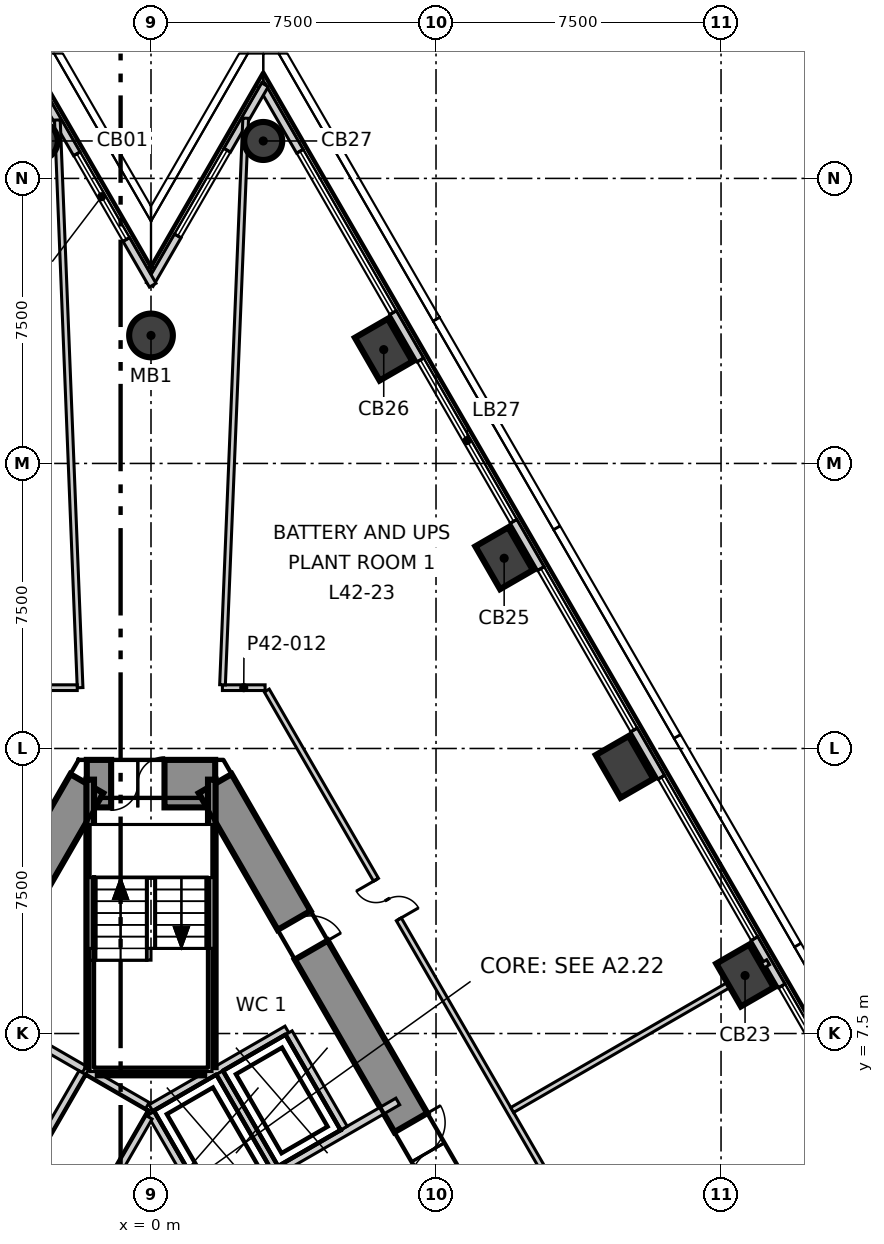
"""IFC4 building model, lengths in metres.
Left out: names, types, materials, properties, quantities, classifications, styles, units other than length and angle.
Written with IfcOpenShell. Run it as: python <this file> out.ifc"""

import sys

from ifc_helpers import new_model, si_unit, direction, frame, frame_2d, origin, origin_2d, place, context, subcontext, project, spatial, polyline, rectangle, circle, outline, extrude, element, fill, save


model = new_model("IFC4")
c1 = context("Model", 3, precision=1e-05, world=origin(), true_north=direction((0.0, 1.0)))
c2 = subcontext(c1, "Body", "Model", "MODEL_VIEW")
j1 = project(units=[si_unit("LENGTHUNIT", "METRE"), si_unit("PLANEANGLEUNIT", "RADIAN")], contexts=[c1])
p1 = place(None, origin())
s1 = spatial("IfcSite", under=j1, at=p1, CompositionType="ELEMENT")
p2 = place(p1, origin())
s2 = spatial("IfcBuilding", under=s1, at=p2, CompositionType="ELEMENT")
p3 = place(p2, frame((0.0, 0.0, 180.8)))
s3 = spatial("IfcBuildingStorey", under=s2, at=p3, CompositionType="ELEMENT", Elevation=180.8)
p4 = place(p3, frame((1.689, 14.075, -0.6), z_axis=(0.0, 0.0, 1.0), x_axis=(-1.0, 0.0, 0.0)))
e1 = element("IfcWall", 1, at=p4, inside=s3, PredefinedType="SHEAR", context=c2, shape_type="SweptSolid", body=[
    extrude(outline(polyline([(-0.216, -0.625), (1.689, -0.625), (3.594, -0.625), (3.161, 0.625), (1.689, 0.625), (0.217, 0.625), (-0.216, -0.625)])), origin(), (0.0, 0.0, 1.0), 4.5),
])
p5 = place(p4, frame((1.336, 0.0, 0.6)))
e2 = element("IfcOpeningElement", 2, at=p5, cuts=e1, PredefinedType="OPENING", context=c2, shape_type="SweptSolid", body=[
    extrude(rectangle(XDim=1.4, YDim=2.1, at=frame_2d((0.7, 1.05))), frame((0.0, 0.635, 0.0), z_axis=(0.0, -1.0, 0.0), x_axis=(1.0, 0.0, 0.0)), (0.0, 0.0, 1.0), 1.27),
])
p6 = place(p3, frame((-1.689, 14.075, -0.6), z_axis=(0.0, 0.0, 1.0), x_axis=(-0.500003116884, -0.866023604243, 0.0)))
e3 = element("IfcWall", 3, at=p6, inside=s3, PredefinedType="SHEAR", context=c2, shape_type="SweptSolid", body=[
    extrude(outline(polyline([(-0.433, -0.5), (1.53, -0.5), (3.493, -0.5), (5.456, -0.5), (7.419, -0.5), (9.382, -0.5), (11.345, -0.5), (13.308, -0.5), (15.271, -0.5), (17.234, -0.5), (19.197, -0.5), (21.16, -0.5), (23.123, -0.5), (22.257, 0.5), (20.273, 0.5), (18.289, 0.5), (16.305, 0.5), (14.321, 0.5), (12.337, 0.5), (10.353, 0.5), (8.369, 0.5), (6.385, 0.5), (4.401, 0.5), (2.417, 0.5), (0.433, 0.5), (-0.433, -0.5)])), origin(), (0.0, 0.0, 1.0), 4.5),
])
p7 = place(p6, frame((10.939, 0.0, 0.6)))
e4 = element("IfcOpeningElement", 4, at=p7, cuts=e3, PredefinedType="OPENING", context=c2, shape_type="SweptSolid", body=[
    extrude(rectangle(XDim=1.1, YDim=2.1, at=frame_2d((0.55, 1.05))), frame((0.0, 0.51, 0.0), z_axis=(0.0, -1.0, 0.0), x_axis=(1.0, 0.0, 0.0)), (0.0, 0.0, 1.0), 1.02),
])
p8 = place(p3, frame((13.034, -5.575, -0.6), z_axis=(0.0, 0.0, 1.0), x_axis=(-0.500003116884, 0.866023604243, 0.0)))
e5 = element("IfcWall", 5, at=p8, inside=s3, PredefinedType="SHEAR", context=c2, shape_type="SweptSolid", body=[
    extrude(outline(polyline([(-0.433, -0.5), (1.53, -0.5), (3.493, -0.5), (5.456, -0.5), (7.419, -0.5), (9.382, -0.5), (11.345, -0.5), (13.308, -0.5), (15.271, -0.5), (17.234, -0.5), (19.197, -0.5), (21.16, -0.5), (23.123, -0.5), (22.257, 0.5), (20.273, 0.5), (18.289, 0.5), (16.305, 0.5), (14.321, 0.5), (12.337, 0.5), (10.353, 0.5), (8.369, 0.5), (6.385, 0.5), (4.401, 0.5), (2.417, 0.5), (0.433, 0.5), (-0.433, -0.5)])), origin(), (0.0, 0.0, 1.0), 4.5),
])
p9 = place(p8, frame((10.589, 0.0, 0.6)))
e6 = element("IfcOpeningElement", 6, at=p9, cuts=e5, PredefinedType="OPENING", context=c2, shape_type="SweptSolid", body=[
    extrude(rectangle(XDim=1.8, YDim=2.1, at=frame_2d((0.9, 1.05))), frame((0.0, 0.51, 0.0), z_axis=(0.0, -1.0, 0.0), x_axis=(1.0, 0.0, 0.0)), (0.0, 0.0, 1.0), 1.02),
])
p10 = place(p8, frame((17.634, 0.0, 0.6)))
e7 = element("IfcOpeningElement", 7, at=p10, cuts=e5, PredefinedType="OPENING", context=c2, shape_type="SweptSolid", body=[
    extrude(rectangle(XDim=0.9, YDim=2.1, at=frame_2d((0.45, 1.05))), frame((0.0, 0.51, 0.0), z_axis=(0.0, -1.0, 0.0), x_axis=(1.0, 0.0, 0.0)), (0.0, 0.0, 1.0), 1.02),
])
p11 = place(p8, frame((4.445, 0.0, 0.6)))
e8 = element("IfcOpeningElement", 8, at=p11, cuts=e5, PredefinedType="OPENING", context=c2, shape_type="SweptSolid", body=[
    extrude(rectangle(XDim=0.9, YDim=2.1, at=frame_2d((0.45, 1.05))), frame((0.0, 0.51, 0.0), z_axis=(0.0, -1.0, 0.0), x_axis=(1.0, 0.0, 0.0)), (0.0, 0.0, 1.0), 1.02),
])
p12 = place(p3, frame((-2.954, 30.985, -0.6), z_axis=(0.0, 0.0, 1.0), x_axis=(0.5, 0.866025403784, 0.0)))
e9 = element("IfcColumn", 9, at=p12, inside=s3, PredefinedType="COLUMN", context=c2, shape_type="SweptSolid", body=[
    extrude(circle(Radius=0.5, at=origin_2d()), origin(), (0.0, 0.0, 1.0), 4.5),
])
for number, where, z_axis, x_axis in (
    (10, (15.632, 9.026, -0.6), (0.0, 0.0, 1.0), (-0.5, 0.866, 0.0)),
    (11, (12.463, 14.515, -0.6), (0.0, 0.0, 1.0), (-0.5, 0.866, 0.0)),
    (12, (9.293, 20.005, -0.6), (0.0, 0.0, 1.0), (-0.5, 0.866, 0.0)),
    (13, (6.124, 25.495, -0.6), (0.0, 0.0, 1.0), (-0.5, 0.866, 0.0)),
):
    element("IfcColumn", number, at=place(p3, frame(where, z_axis=z_axis, x_axis=x_axis)), inside=s3, PredefinedType="COLUMN", context=c2, shape_type="SweptSolid", body=[
        extrude(rectangle(XDim=1.3, YDim=1.0, at=origin_2d()), origin(), (0.0, 0.0, 1.0), 4.5),
    ])
p13 = place(p3, frame((2.954, 30.985, -0.6), z_axis=(0.0, 0.0, 1.0), x_axis=(-0.5, 0.866025403784, 0.0)))
e14 = element("IfcColumn", 14, at=p13, inside=s3, PredefinedType="COLUMN", context=c2, shape_type="SweptSolid", body=[
    extrude(circle(Radius=0.5, at=origin_2d()), origin(), (0.0, 0.0, 1.0), 4.5),
])
p14 = place(p3, frame((0.0, 25.868, -0.6), z_axis=(0.0, 0.0, 1.0), x_axis=(1.0, 0.0, 0.0)))
e15 = element("IfcColumn", 15, at=p14, inside=s3, PredefinedType="COLUMN", context=c2, shape_type="SweptSolid", body=[
    extrude(circle(Radius=0.575, at=origin_2d()), origin(), (0.0, 0.0, 1.0), 4.5),
])
p15 = place(p3, frame((29.569, -13.712, 0.0), z_axis=(0.0, 0.0, 1.0), x_axis=(-0.500011769953, 0.866018608292, 0.0)))
e16 = element("IfcWall", 16, at=p15, inside=s3, PredefinedType="ELEMENTEDWALL", context=c2, shape_type="SweptSolid", body=[
    extrude(rectangle(XDim=53.299, YDim=0.2, at=frame_2d((26.649, 0.0))), origin(), (0.0, 0.0, 1.0), 3.9),
])
p16 = place(p15, frame((2.022, 0.0, 0.6)))
e17 = element("IfcOpeningElement", 17, at=p16, cuts=e16, PredefinedType="OPENING", context=c2, shape_type="SweptSolid", body=[
    extrude(rectangle(XDim=4.9, YDim=3.0, at=frame_2d((2.45, 1.5))), frame((0.0, 0.11, 0.0), z_axis=(0.0, -1.0, 0.0), x_axis=(1.0, 0.0, 0.0)), (0.0, 0.0, 1.0), 0.22),
])
p17 = place(p15, frame((8.361, 0.0, 0.6)))
e18 = element("IfcOpeningElement", 18, at=p17, cuts=e16, PredefinedType="OPENING", context=c2, shape_type="SweptSolid", body=[
    extrude(rectangle(XDim=4.9, YDim=3.0, at=frame_2d((2.45, 1.5))), frame((0.0, 0.11, 0.0), z_axis=(0.0, -1.0, 0.0), x_axis=(1.0, 0.0, 0.0)), (0.0, 0.0, 1.0), 0.22),
])
p18 = place(p15, frame((14.701, 0.0, 0.6)))
e19 = element("IfcOpeningElement", 19, at=p18, cuts=e16, PredefinedType="OPENING", context=c2, shape_type="SweptSolid", body=[
    extrude(rectangle(XDim=4.9, YDim=3.0, at=frame_2d((2.45, 1.5))), frame((0.0, 0.11, 0.0), z_axis=(0.0, -1.0, 0.0), x_axis=(1.0, 0.0, 0.0)), (0.0, 0.0, 1.0), 0.22),
])
p19 = place(p15, frame((21.04, 0.0, 0.6)))
e20 = element("IfcOpeningElement", 20, at=p19, cuts=e16, PredefinedType="OPENING", context=c2, shape_type="SweptSolid", body=[
    extrude(rectangle(XDim=4.9, YDim=3.0, at=frame_2d((2.45, 1.5))), frame((0.0, 0.11, 0.0), z_axis=(0.0, -1.0, 0.0), x_axis=(1.0, 0.0, 0.0)), (0.0, 0.0, 1.0), 0.22),
])
p20 = place(p15, frame((27.379, 0.0, 0.6)))
e21 = element("IfcOpeningElement", 21, at=p20, cuts=e16, PredefinedType="OPENING", context=c2, shape_type="SweptSolid", body=[
    extrude(rectangle(XDim=4.9, YDim=3.0, at=frame_2d((2.45, 1.5))), frame((0.0, 0.11, 0.0), z_axis=(0.0, -1.0, 0.0), x_axis=(1.0, 0.0, 0.0)), (0.0, 0.0, 1.0), 0.22),
])
p21 = place(p15, frame((33.718, 0.0, 0.6)))
e22 = element("IfcOpeningElement", 22, at=p21, cuts=e16, PredefinedType="OPENING", context=c2, shape_type="SweptSolid", body=[
    extrude(rectangle(XDim=4.9, YDim=3.0, at=frame_2d((2.45, 1.5))), frame((0.0, 0.11, 0.0), z_axis=(0.0, -1.0, 0.0), x_axis=(1.0, 0.0, 0.0)), (0.0, 0.0, 1.0), 0.22),
])
p22 = place(p15, frame((40.057, 0.0, 0.6)))
e23 = element("IfcOpeningElement", 23, at=p22, cuts=e16, PredefinedType="OPENING", context=c2, shape_type="SweptSolid", body=[
    extrude(rectangle(XDim=4.9, YDim=3.0, at=frame_2d((2.45, 1.5))), frame((0.0, 0.11, 0.0), z_axis=(0.0, -1.0, 0.0), x_axis=(1.0, 0.0, 0.0)), (0.0, 0.0, 1.0), 0.22),
])
p23 = place(p15, frame((46.397, 0.0, 0.6)))
e24 = element("IfcOpeningElement", 24, at=p23, cuts=e16, PredefinedType="OPENING", context=c2, shape_type="SweptSolid", body=[
    extrude(rectangle(XDim=4.9, YDim=3.0, at=frame_2d((2.45, 1.5))), frame((0.0, 0.11, 0.0), z_axis=(0.0, -1.0, 0.0), x_axis=(1.0, 0.0, 0.0)), (0.0, 0.0, 1.0), 0.22),
])
p24 = place(p3, frame((2.999, 32.463, 0.0), z_axis=(0.0, 0.0, 1.0), x_axis=(-0.499933722365, -0.866063665814, 0.0)))
e25 = element("IfcWall", 25, at=p24, inside=s3, PredefinedType="ELEMENTEDWALL", context=c2, shape_type="SweptSolid", body=[
    extrude(rectangle(XDim=6.069, YDim=0.2, at=frame_2d((3.034, 0.0))), origin(), (0.0, 0.0, 1.0), 3.9),
])
p25 = place(p24, frame((1.99, 0.0, 0.6)))
e26 = element("IfcOpeningElement", 26, at=p25, cuts=e25, PredefinedType="OPENING", context=c2, shape_type="SweptSolid", body=[
    extrude(rectangle(XDim=2.6, YDim=3.0, at=frame_2d((1.3, 1.5))), frame((0.0, 0.11, 0.0), z_axis=(0.0, -1.0, 0.0), x_axis=(1.0, 0.0, 0.0)), (0.0, 0.0, 1.0), 0.22),
])
p26 = place(p3, frame((0.045, 27.19, 0.0), z_axis=(0.0, 0.0, 1.0), x_axis=(-0.499916304465, 0.866073720032, 0.0)))
e27 = element("IfcWall", 27, at=p26, inside=s3, PredefinedType="ELEMENTEDWALL", context=c2, shape_type="SweptSolid", body=[
    extrude(rectangle(XDim=6.069, YDim=0.2, at=frame_2d((3.034, 0.0))), origin(), (0.0, 0.0, 1.0), 3.9),
])
p27 = place(p26, frame((1.39, 0.0, 0.6)))
e28 = element("IfcOpeningElement", 28, at=p27, cuts=e27, PredefinedType="OPENING", context=c2, shape_type="SweptSolid", body=[
    extrude(rectangle(XDim=2.6, YDim=3.0, at=frame_2d((1.3, 1.5))), frame((0.0, 0.11, 0.0), z_axis=(0.0, -1.0, 0.0), x_axis=(1.0, 0.0, 0.0)), (0.0, 0.0, 1.0), 0.22),
])
p28 = place(p3, frame((-2.464, 31.537, 0.0), z_axis=(0.0, 0.0, 1.0), x_axis=(0.040012389266, -0.999199183699, 0.0)))
e29 = element("IfcWall", 29, at=p28, inside=s3, PredefinedType="PARTITIONING", context=c2, shape_type="SweptSolid", body=[
    extrude(rectangle(XDim=14.949, YDim=0.15, at=frame_2d((7.475, 0.0))), origin(), (0.0, 0.0, 1.0), 3.2),
])
p29 = place(p3, frame((-2.916, 16.6, 0.0), z_axis=(0.0, 0.0, 1.0), x_axis=(1.0, 0.0, 0.0)))
e30 = element("IfcWall", 30, at=p29, inside=s3, PredefinedType="PARTITIONING", context=c2, shape_type="SweptSolid", body=[
    extrude(rectangle(XDim=0.975, YDim=0.15, at=frame_2d((0.488, 0.0))), origin(), (0.0, 0.0, 1.0), 3.9),
])
p30 = place(p3, frame((1.879, 16.6, 0.0), z_axis=(0.0, 0.0, 1.0), x_axis=(1.0, 0.0, 0.0)))
e31 = element("IfcWall", 31, at=p30, inside=s3, PredefinedType="PARTITIONING", context=c2, shape_type="SweptSolid", body=[
    extrude(rectangle(XDim=1.123, YDim=0.15, at=frame_2d((0.562, 0.0))), origin(), (0.0, 0.0, 1.0), 3.9),
])
p31 = place(p3, frame((3.046, 16.525, 0.0), z_axis=(0.0, 0.0, 1.0), x_axis=(0.499986250302, -0.866033342031, 0.0)))
e32 = element("IfcWall", 32, at=p31, inside=s3, PredefinedType="PARTITIONING", context=c2, shape_type="SweptSolid", body=[
    extrude(rectangle(XDim=25.663, YDim=0.15, at=frame_2d((12.832, 0.0))), origin(), (0.0, 0.0, 1.0), 3.9),
])
p32 = place(p31, frame((18.625, 0.0, 0.0)))
e33 = element("IfcOpeningElement", 33, at=p32, cuts=e32, PredefinedType="OPENING", context=c2, shape_type="SweptSolid", body=[
    extrude(rectangle(XDim=1.2, YDim=2.1, at=frame_2d((0.6, 1.05))), frame((0.0, 0.085, 0.0), z_axis=(0.0, -1.0, 0.0), x_axis=(1.0, 0.0, 0.0)), (0.0, 0.0, 1.0), 0.17),
])
p33 = place(p31, frame((5.75, 0.0, 0.0)))
e34 = element("IfcOpeningElement", 34, at=p33, cuts=e32, PredefinedType="OPENING", context=c2, shape_type="SweptSolid", body=[
    extrude(rectangle(XDim=1.2, YDim=2.1, at=frame_2d((0.6, 1.05))), frame((0.0, 0.085, 0.0), z_axis=(0.0, -1.0, 0.0), x_axis=(1.0, 0.0, 0.0)), (0.0, 0.0, 1.0), 0.17),
])
p34 = place(p3, frame((1.882, 16.675, 0.0), z_axis=(0.0, 0.0, 1.0), x_axis=(0.040871709395, 0.999164402574, 0.0)))
e35 = element("IfcWall", 35, at=p34, inside=s3, PredefinedType="PARTITIONING", context=c2, shape_type="SweptSolid", body=[
    extrude(rectangle(XDim=14.921, YDim=0.15, at=frame_2d((7.461, 0.0))), origin(), (0.0, 0.0, 1.0), 3.2),
])
p35 = place(p3, frame((9.504, 5.488, 0.0), z_axis=(0.0, 0.0, 1.0), x_axis=(0.8660261172, 0.499998764326, 0.0)))
e36 = element("IfcWall", 36, at=p35, inside=s3, PredefinedType="PARTITIONING", context=c2, shape_type="SweptSolid", body=[
    extrude(rectangle(XDim=7.776, YDim=0.15, at=frame_2d((3.888, 0.0))), origin(), (0.0, 0.0, 1.0), 3.4),
])
p36 = place(p3, frame((-0.002, 5.541, 0.0), z_axis=(0.0, 0.0, 1.0), x_axis=(0.86600155993, 0.500041296494, 0.0)))
e37 = element("IfcWall", 37, at=p36, inside=s3, PredefinedType="SOLIDWALL", context=c2, shape_type="SweptSolid", body=[
    extrude(rectangle(XDim=4.132, YDim=0.2, at=frame_2d((2.066, 0.0))), origin(), (0.0, 0.0, 1.0), 3.9),
])
p37 = place(p3, frame((0.0, 5.4, 0.0), z_axis=(0.0, 0.0, 1.0), x_axis=(0.500103862429, -0.865965430478, 0.0)))
e38 = element("IfcWall", 38, at=p37, inside=s3, PredefinedType="SOLIDWALL", context=c2, shape_type="SweptSolid", body=[
    extrude(rectangle(XDim=2.973, YDim=0.2, at=frame_2d((1.487, 0.0))), origin(), (0.0, 0.0, 1.0), 3.9),
])
p38 = place(p3, frame((1.578, 2.874, 0.0), z_axis=(0.0, 0.0, 1.0), x_axis=(0.866053804324, 0.499950805595, 0.0)))
e39 = element("IfcWall", 39, at=p38, inside=s3, PredefinedType="SOLIDWALL", context=c2, shape_type="SweptSolid", body=[
    extrude(rectangle(XDim=5.676, YDim=0.2, at=frame_2d((2.838, 0.0))), origin(), (0.0, 0.0, 1.0), 3.9),
])
for number, where, z_axis, x_axis in (
    (40, (3.626, 7.52, 0.0), (0.0, 0.0, 1.0), (0.5, -0.866, 0.0)),
    (41, (1.807, 6.47, 0.0), (0.0, 0.0, 1.0), (0.5, -0.866, 0.0)),
):
    element("IfcWall", number, at=place(p3, frame(where, z_axis=z_axis, x_axis=x_axis)), inside=s3, PredefinedType="SOLIDWALL", context=c2, shape_type="SweptSolid", body=[
        extrude(rectangle(XDim=2.9, YDim=0.2, at=frame_2d((1.45, 0.0))), origin(), (0.0, 0.0, 1.0), 3.9),
    ])
p39 = place(p3, frame((-3.489, 7.557, 0.0), z_axis=(0.0, 0.0, 1.0), x_axis=(0.866010750942, -0.50002537861, 0.0)))
e42 = element("IfcWall", 42, at=p39, inside=s3, PredefinedType="SOLIDWALL", context=c2, shape_type="SweptSolid", body=[
    extrude(rectangle(XDim=2.0, YDim=0.2, at=frame_2d((1.0, 0.0))), origin(), (0.0, 0.0, 1.0), 3.9),
])
p40 = place(p3, frame((-3.257, 3.959, 0.0), z_axis=(0.0, 0.0, 1.0), x_axis=(0.50012328804, 0.865954211699, 0.0)))
e43 = element("IfcWall", 43, at=p40, inside=s3, PredefinedType="SOLIDWALL", context=c2, shape_type="SweptSolid", body=[
    extrude(rectangle(XDim=2.9, YDim=0.2, at=frame_2d((1.45, 0.0))), origin(), (0.0, 0.0, 1.0), 3.9),
])
p41 = place(p3, frame((-1.67, 6.507, 0.0), z_axis=(0.0, 0.0, 1.0), x_axis=(0.865941441609, -0.500145398563, 0.0)))
e44 = element("IfcWall", 44, at=p41, inside=s3, PredefinedType="SOLIDWALL", context=c2, shape_type="SweptSolid", body=[
    extrude(rectangle(XDim=1.815, YDim=0.2, at=frame_2d((0.908, 0.0))), origin(), (0.0, 0.0, 1.0), 3.9),
])
p42 = place(p3, frame((-1.438, 2.909, 0.0), z_axis=(0.0, 0.0, 1.0), x_axis=(0.499829630636, 0.866123744241, 0.0)))
e45 = element("IfcWall", 45, at=p42, inside=s3, PredefinedType="SOLIDWALL", context=c2, shape_type="SweptSolid", body=[
    extrude(rectangle(XDim=2.761, YDim=0.2, at=frame_2d((1.38, 0.0))), origin(), (0.0, 0.0, 1.0), 3.9),
])
p43 = place(p3, frame((1.6, 6.615, 0.0), z_axis=(0.0, 0.0, 1.0), x_axis=(0.0, 1.0, 0.0)))
e46 = element("IfcWall", 46, at=p43, inside=s3, PredefinedType="SOLIDWALL", context=c2, shape_type="SweptSolid", body=[
    extrude(rectangle(XDim=7.565, YDim=0.2, at=frame_2d((3.782, 0.0))), origin(), (0.0, 0.0, 1.0), 3.9),
])
p44 = place(p3, frame((-1.4, 6.5, 0.0), z_axis=(0.0, 0.0, 1.0), x_axis=(1.0, 0.0, 0.0)))
e47 = element("IfcWall", 47, at=p44, inside=s3, PredefinedType="SOLIDWALL", context=c2, shape_type="SweptSolid", body=[
    extrude(rectangle(XDim=2.8, YDim=0.2, at=frame_2d((1.4, 0.0))), origin(), (0.0, 0.0, 1.0), 3.9),
])
p45 = place(p3, frame((-1.6, 6.615, 0.0), z_axis=(0.0, 0.0, 1.0), x_axis=(0.0, 1.0, 0.0)))
e48 = element("IfcWall", 48, at=p45, inside=s3, PredefinedType="SOLIDWALL", context=c2, shape_type="SweptSolid", body=[
    extrude(rectangle(XDim=7.565, YDim=0.2, at=frame_2d((3.782, 0.0))), origin(), (0.0, 0.0, 1.0), 3.9),
])
p46 = place(p19, origin())
e49 = element("IfcWindow", 49, at=p46, inside=s3, PartitioningType="SINGLE_PANEL", PredefinedType="WINDOW", context=c2, shape_type="SweptSolid", body=[
    extrude(rectangle(XDim=4.9, YDim=3.0, at=frame_2d((2.45, 1.5))), frame((0.0, 0.03, 0.0), z_axis=(0.0, -1.0, 0.0), x_axis=(1.0, 0.0, 0.0)), (0.0, 0.0, 1.0), 0.06),
])
fill(e20, e49)
p47 = place(p20, origin())
e50 = element("IfcWindow", 50, at=p47, inside=s3, PartitioningType="SINGLE_PANEL", PredefinedType="WINDOW", context=c2, shape_type="SweptSolid", body=[
    extrude(rectangle(XDim=4.9, YDim=3.0, at=frame_2d((2.45, 1.5))), frame((0.0, 0.03, 0.0), z_axis=(0.0, -1.0, 0.0), x_axis=(1.0, 0.0, 0.0)), (0.0, 0.0, 1.0), 0.06),
])
fill(e21, e50)
p48 = place(p21, origin())
e51 = element("IfcWindow", 51, at=p48, inside=s3, PartitioningType="SINGLE_PANEL", PredefinedType="WINDOW", context=c2, shape_type="SweptSolid", body=[
    extrude(rectangle(XDim=4.9, YDim=3.0, at=frame_2d((2.45, 1.5))), frame((0.0, 0.03, 0.0), z_axis=(0.0, -1.0, 0.0), x_axis=(1.0, 0.0, 0.0)), (0.0, 0.0, 1.0), 0.06),
])
fill(e22, e51)
p49 = place(p22, origin())
e52 = element("IfcWindow", 52, at=p49, inside=s3, PartitioningType="SINGLE_PANEL", PredefinedType="WINDOW", context=c2, shape_type="SweptSolid", body=[
    extrude(rectangle(XDim=4.9, YDim=3.0, at=frame_2d((2.45, 1.5))), frame((0.0, 0.03, 0.0), z_axis=(0.0, -1.0, 0.0), x_axis=(1.0, 0.0, 0.0)), (0.0, 0.0, 1.0), 0.06),
])
fill(e23, e52)
p50 = place(p23, origin())
e53 = element("IfcWindow", 53, at=p50, inside=s3, PartitioningType="SINGLE_PANEL", PredefinedType="WINDOW", context=c2, shape_type="SweptSolid", body=[
    extrude(rectangle(XDim=4.9, YDim=3.0, at=frame_2d((2.45, 1.5))), frame((0.0, 0.03, 0.0), z_axis=(0.0, -1.0, 0.0), x_axis=(1.0, 0.0, 0.0)), (0.0, 0.0, 1.0), 0.06),
])
fill(e24, e53)
p51 = place(p25, origin())
e54 = element("IfcWindow", 54, at=p51, inside=s3, PartitioningType="SINGLE_PANEL", PredefinedType="WINDOW", context=c2, shape_type="SweptSolid", body=[
    extrude(rectangle(XDim=2.6, YDim=3.0, at=frame_2d((1.3, 1.5))), frame((0.0, 0.03, 0.0), z_axis=(0.0, -1.0, 0.0), x_axis=(1.0, 0.0, 0.0)), (0.0, 0.0, 1.0), 0.06),
])
fill(e26, e54)
p52 = place(p27, origin())
e55 = element("IfcWindow", 55, at=p52, inside=s3, PartitioningType="SINGLE_PANEL", PredefinedType="WINDOW", context=c2, shape_type="SweptSolid", body=[
    extrude(rectangle(XDim=2.6, YDim=3.0, at=frame_2d((1.3, 1.5))), frame((0.0, 0.03, 0.0), z_axis=(0.0, -1.0, 0.0), x_axis=(1.0, 0.0, 0.0)), (0.0, 0.0, 1.0), 0.06),
])
fill(e28, e55)
p53 = place(p33, origin())
e56 = element("IfcDoor", 56, at=p53, inside=s3, OperationType="DOUBLE_DOOR_SINGLE_SWING", PredefinedType="DOOR", context=c2, shape_type="SweptSolid", body=[
    extrude(rectangle(XDim=1.2, YDim=2.1, at=frame_2d((0.6, 1.05))), frame((0.0, 0.025, 0.0), z_axis=(0.0, -1.0, 0.0), x_axis=(1.0, 0.0, 0.0)), (0.0, 0.0, 1.0), 0.05),
])
fill(e34, e56)
p54 = place(p9, origin())
e57 = element("IfcDoor", 57, at=p54, inside=s3, OperationType="DOUBLE_DOOR_SINGLE_SWING", PredefinedType="DOOR", context=c2, shape_type="SweptSolid", body=[
    extrude(rectangle(XDim=1.8, YDim=2.1, at=frame_2d((0.9, 1.05))), frame((0.0, 0.025, 0.0), z_axis=(0.0, -1.0, 0.0), x_axis=(1.0, 0.0, 0.0)), (0.0, 0.0, 1.0), 0.05),
])
fill(e6, e57)
p55 = place(p5, origin())
e58 = element("IfcDoor", 58, at=p55, inside=s3, OperationType="DOUBLE_DOOR_SINGLE_SWING", PredefinedType="DOOR", context=c2, shape_type="SweptSolid", body=[
    extrude(rectangle(XDim=1.4, YDim=2.1, at=frame_2d((0.7, 1.05))), frame((0.0, 0.025, 0.0), z_axis=(0.0, -1.0, 0.0), x_axis=(1.0, 0.0, 0.0)), (0.0, 0.0, 1.0), 0.05),
])
fill(e2, e58)
p56 = place(p10, origin())
e59 = element("IfcDoor", 59, at=p56, inside=s3, OperationType="SINGLE_SWING_LEFT", PredefinedType="DOOR", context=c2, shape_type="SweptSolid", body=[
    extrude(rectangle(XDim=0.9, YDim=2.1, at=frame_2d((0.45, 1.05))), frame((0.0, 0.025, 0.0), z_axis=(0.0, -1.0, 0.0), x_axis=(1.0, 0.0, 0.0)), (0.0, 0.0, 1.0), 0.05),
])
fill(e7, e59)
save(model, sys.argv[1])
